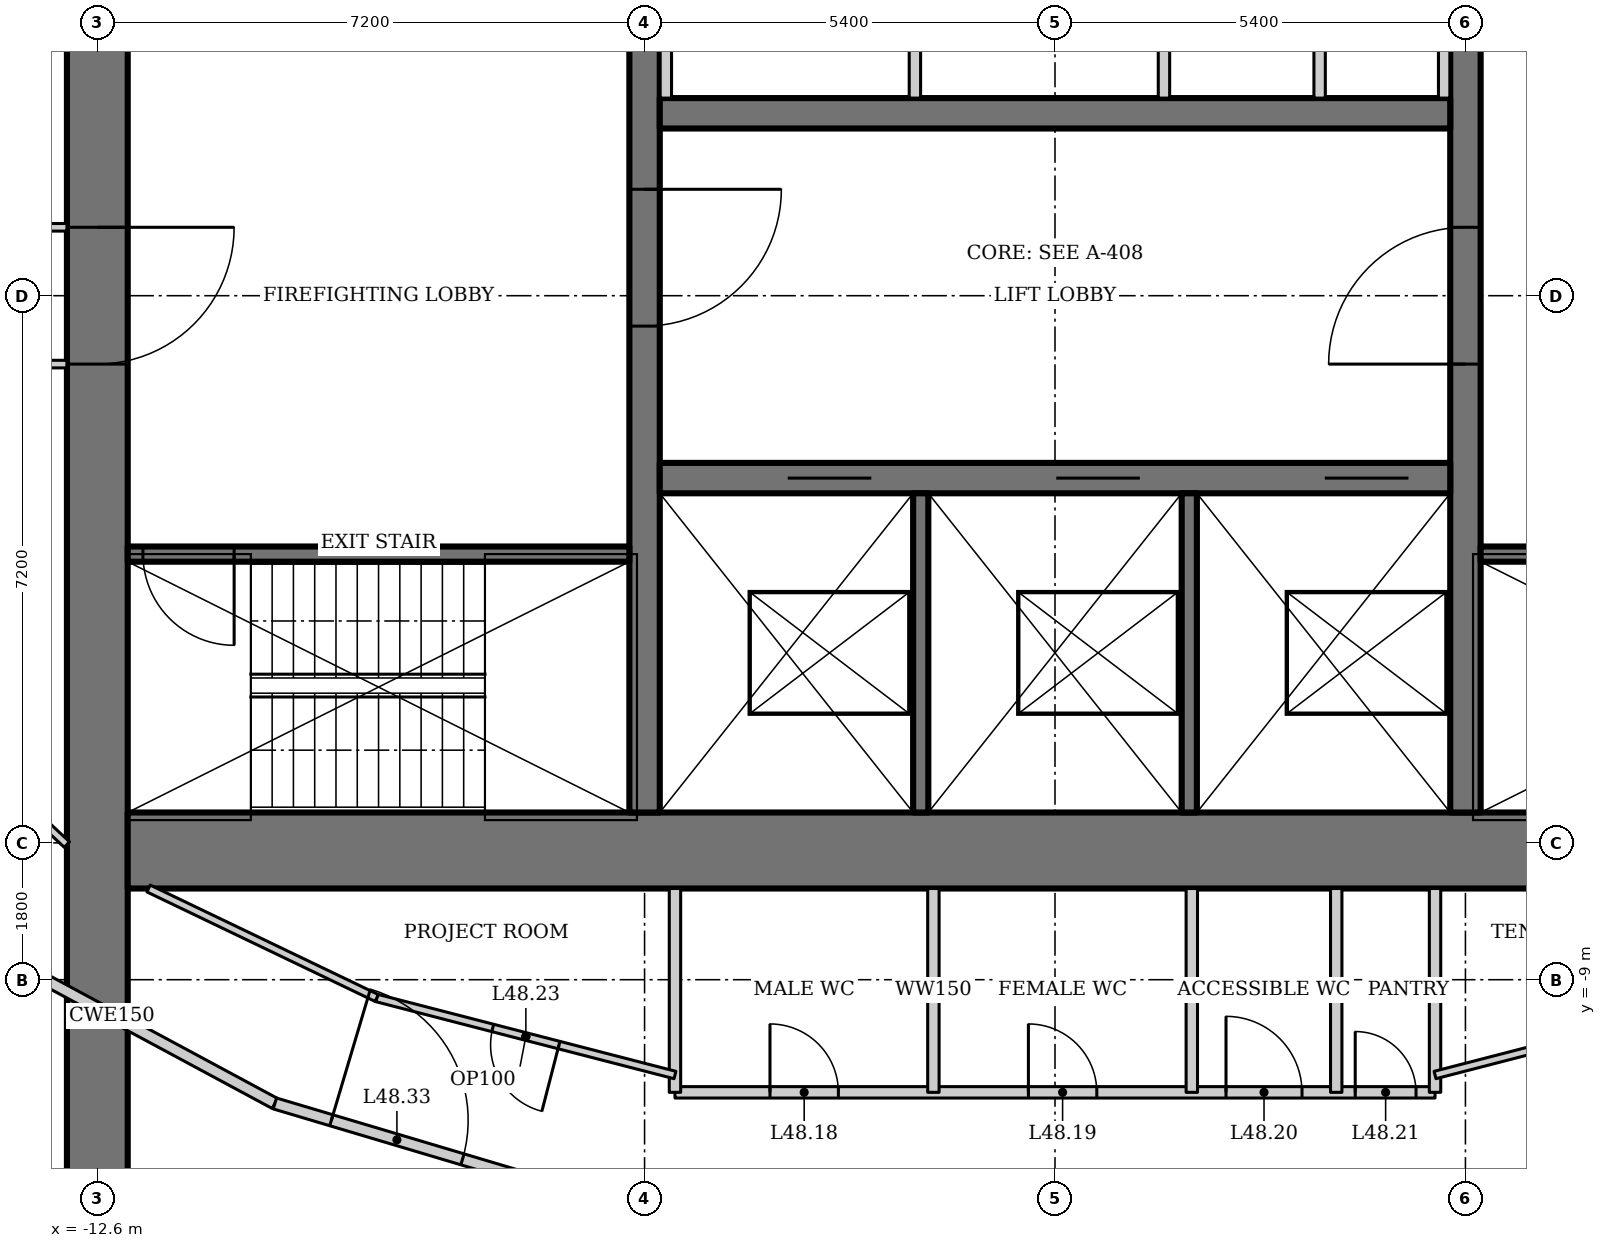
"""IFC4 building model, lengths in metres.
Left out: names, types, materials, properties, quantities, classifications, styles, units other than length and angle.
Written with IfcOpenShell. Run it as: python <this file> out.ifc"""

import sys

from ifc_helpers import new_model, si_unit, direction, frame, frame_2d, origin, place, context, subcontext, project, spatial, rectangle, extrude, element, fill, save


model = new_model("IFC4")
c1 = context("Model", 3, precision=1e-05, world=origin(), true_north=direction((0.0, 1.0)))
c2 = subcontext(c1, "Body", "Model", "MODEL_VIEW")
j1 = project(units=[si_unit("LENGTHUNIT", "METRE"), si_unit("PLANEANGLEUNIT", "RADIAN")], contexts=[c1])
p1 = place(None, origin())
s1 = spatial("IfcSite", under=j1, at=p1, CompositionType="ELEMENT")
p2 = place(p1, origin())
s2 = spatial("IfcBuilding", under=s1, at=p2, CompositionType="ELEMENT")
p3 = place(p2, frame((0.0, 0.0, 207.4)))
s3 = spatial("IfcBuildingStorey", under=s2, at=p3, CompositionType="ELEMENT", Elevation=207.4)
p4 = place(p3, frame((-12.6, 13.0, 0.0), z_axis=(0.0, 0.0, 1.0), x_axis=(0.0, -1.0, 0.0)))
e1 = element("IfcWall", 1, at=p4, inside=s3, PredefinedType="SHEAR", context=c2, shape_type="SweptSolid", body=[
    extrude(rectangle(XDim=26.0, YDim=0.8, at=frame_2d((13.0, 0.0))), origin(), (0.0, 0.0, 1.0), 4.2),
])
p5 = place(p4, frame((12.1, 0.0, 0.0)))
e2 = element("IfcOpeningElement", 2, at=p5, cuts=e1, PredefinedType="OPENING", context=c2, shape_type="SweptSolid", body=[
    extrude(rectangle(XDim=1.8, YDim=2.1, at=frame_2d((0.9, 1.05))), frame((0.0, 0.41, 0.0), z_axis=(0.0, -1.0, 0.0), x_axis=(1.0, 0.0, 0.0)), (0.0, 0.0, 1.0), 0.82),
])
p6 = place(p3, frame((-12.2, -7.3, 0.0), z_axis=(0.0, 0.0, 1.0), x_axis=(1.0, 0.0, 0.0)))
e3 = element("IfcWall", 3, at=p6, inside=s3, PredefinedType="SHEAR", context=c2, shape_type="SweptSolid", body=[
    extrude(rectangle(XDim=24.4, YDim=1.0, at=frame_2d((12.2, 0.0))), origin(), (0.0, 0.0, 1.0), 4.2),
])
p7 = place(p3, frame((5.4, -6.8, 0.0), z_axis=(0.0, 0.0, 1.0), x_axis=(0.0, 1.0, 0.0)))
e4 = element("IfcWall", 4, at=p7, inside=s3, PredefinedType="SHEAR", context=c2, shape_type="SweptSolid", body=[
    extrude(rectangle(XDim=14.6, YDim=0.4, at=frame_2d((7.3, 0.0))), origin(), (0.0, 0.0, 1.0), 4.2),
])
p8 = place(p7, frame((5.9, 0.0, 0.0)))
e5 = element("IfcOpeningElement", 5, at=p8, cuts=e4, PredefinedType="OPENING", context=c2, shape_type="SweptSolid", body=[
    extrude(rectangle(XDim=1.8, YDim=2.1, at=frame_2d((0.9, 1.05))), frame((0.0, 0.21, 0.0), z_axis=(0.0, -1.0, 0.0), x_axis=(1.0, 0.0, 0.0)), (0.0, 0.0, 1.0), 0.42),
])
p9 = place(p3, frame((-5.4, 7.8, 0.0), z_axis=(0.0, 0.0, 1.0), x_axis=(0.0, -1.0, 0.0)))
e6 = element("IfcWall", 6, at=p9, inside=s3, PredefinedType="SHEAR", context=c2, shape_type="SweptSolid", body=[
    extrude(rectangle(XDim=14.6, YDim=0.4, at=frame_2d((7.3, 0.0))), origin(), (0.0, 0.0, 1.0), 4.2),
])
p10 = place(p9, frame((6.4, 0.0, 0.0)))
e7 = element("IfcOpeningElement", 7, at=p10, cuts=e6, PredefinedType="OPENING", context=c2, shape_type="SweptSolid", body=[
    extrude(rectangle(XDim=1.8, YDim=2.1, at=frame_2d((0.9, 1.05))), frame((0.0, 0.21, 0.0), z_axis=(0.0, -1.0, 0.0), x_axis=(1.0, 0.0, 0.0)), (0.0, 0.0, 1.0), 0.42),
])
p11 = place(p3, frame((-5.2, -2.4, 0.0), z_axis=(0.0, 0.0, 1.0), x_axis=(1.0, 0.0, 0.0)))
e8 = element("IfcWall", 8, at=p11, inside=s3, PredefinedType="SHEAR", context=c2, shape_type="SweptSolid", body=[
    extrude(rectangle(XDim=10.4, YDim=0.4, at=frame_2d((5.2, 0.0))), origin(), (0.0, 0.0, 1.0), 4.2),
])
p12 = place(p11, frame((1.683, 0.0, 0.0)))
e9 = element("IfcOpeningElement", 9, at=p12, cuts=e8, PredefinedType="OPENING", context=c2, shape_type="SweptSolid", body=[
    extrude(rectangle(XDim=1.1, YDim=2.2, at=frame_2d((0.55, 1.1))), frame((0.0, 0.21, 0.0), z_axis=(0.0, -1.0, 0.0), x_axis=(1.0, 0.0, 0.0)), (0.0, 0.0, 1.0), 0.42),
])
p13 = place(p11, frame((5.217, 0.0, 0.0)))
e10 = element("IfcOpeningElement", 10, at=p13, cuts=e8, PredefinedType="OPENING", context=c2, shape_type="SweptSolid", body=[
    extrude(rectangle(XDim=1.1, YDim=2.2, at=frame_2d((0.55, 1.1))), frame((0.0, 0.21, 0.0), z_axis=(0.0, -1.0, 0.0), x_axis=(1.0, 0.0, 0.0)), (0.0, 0.0, 1.0), 0.42),
])
p14 = place(p11, frame((8.75, 0.0, 0.0)))
e11 = element("IfcOpeningElement", 11, at=p14, cuts=e8, PredefinedType="OPENING", context=c2, shape_type="SweptSolid", body=[
    extrude(rectangle(XDim=1.1, YDim=2.2, at=frame_2d((0.55, 1.1))), frame((0.0, 0.21, 0.0), z_axis=(0.0, -1.0, 0.0), x_axis=(1.0, 0.0, 0.0)), (0.0, 0.0, 1.0), 0.42),
])
for number, where, z_axis, x_axis in (
    (12, (-1.767, -2.6, 0.0), (0.0, 0.0, 1.0), (0.0, -1.0, 0.0)),
    (13, (1.767, -2.6, 0.0), (0.0, 0.0, 1.0), (0.0, -1.0, 0.0)),
):
    element("IfcWall", number, at=place(p3, frame(where, z_axis=z_axis, x_axis=x_axis)), inside=s3, PredefinedType="SOLIDWALL", context=c2, shape_type="SweptSolid", body=[
        extrude(rectangle(XDim=4.2, YDim=0.2, at=frame_2d((2.1, 0.0))), origin(), (0.0, 0.0, 1.0), 4.2),
    ])
p15 = place(p3, frame((5.2, 2.4, 0.0), z_axis=(0.0, 0.0, 1.0), x_axis=(-1.0, 0.0, 0.0)))
e14 = element("IfcWall", 14, at=p15, inside=s3, PredefinedType="SHEAR", context=c2, shape_type="SweptSolid", body=[
    extrude(rectangle(XDim=10.4, YDim=0.4, at=frame_2d((5.2, 0.0))), origin(), (0.0, 0.0, 1.0), 4.2),
])
p16 = place(p3, frame((5.6, -3.4, 0.0), z_axis=(0.0, 0.0, 1.0), x_axis=(1.0, 0.0, 0.0)))
e15 = element("IfcWall", 15, at=p16, inside=s3, PredefinedType="SHEAR", context=c2, shape_type="SweptSolid", body=[
    extrude(rectangle(XDim=6.6, YDim=0.2, at=frame_2d((3.3, 0.0))), origin(), (0.0, 0.0, 1.0), 4.2),
])
p17 = place(p16, frame((5.2, 0.0, 0.0)))
e16 = element("IfcOpeningElement", 16, at=p17, cuts=e15, PredefinedType="OPENING", context=c2, shape_type="SweptSolid", body=[
    extrude(rectangle(XDim=1.2, YDim=2.1, at=frame_2d((0.6, 1.05))), frame((0.0, 0.11, 0.0), z_axis=(0.0, -1.0, 0.0), x_axis=(1.0, 0.0, 0.0)), (0.0, 0.0, 1.0), 0.22),
])
p18 = place(p3, frame((-5.6, -3.4, 0.0), z_axis=(0.0, 0.0, 1.0), x_axis=(-1.0, 0.0, 0.0)))
e17 = element("IfcWall", 17, at=p18, inside=s3, PredefinedType="SHEAR", context=c2, shape_type="SweptSolid", body=[
    extrude(rectangle(XDim=6.6, YDim=0.2, at=frame_2d((3.3, 0.0))), origin(), (0.0, 0.0, 1.0), 4.2),
])
p19 = place(p18, frame((5.2, 0.0, 0.0)))
e18 = element("IfcOpeningElement", 18, at=p19, cuts=e17, PredefinedType="OPENING", context=c2, shape_type="SweptSolid", body=[
    extrude(rectangle(XDim=1.2, YDim=2.1, at=frame_2d((0.6, 1.05))), frame((0.0, 0.11, 0.0), z_axis=(0.0, -1.0, 0.0), x_axis=(1.0, 0.0, 0.0)), (0.0, 0.0, 1.0), 0.22),
])
p20 = place(p3, frame((-14.556, -8.318, 0.0), z_axis=(0.0, 0.0, 1.0), x_axis=(0.88053863253, -0.47397438393, 0.0)))
e19 = element("IfcWall", 19, at=p20, inside=s3, PredefinedType="PARTITIONING", context=c2, shape_type="SweptSolid", body=[
    extrude(rectangle(XDim=4.875, YDim=0.15, at=frame_2d((2.438, 0.0))), origin(), (0.0, 0.0, 1.0), 4.05),
])
p21 = place(p3, frame((-10.264, -10.628, 0.0), z_axis=(0.0, 0.0, 1.0), x_axis=(0.958384389306, -0.285480931648, 0.0)))
e20 = element("IfcWall", 20, at=p21, inside=s3, PredefinedType="PARTITIONING", context=c2, shape_type="SweptSolid", body=[
    extrude(rectangle(XDim=4.392, YDim=0.15, at=frame_2d((2.196, 0.0))), origin(), (0.0, 0.0, 1.0), 4.05),
])
p22 = place(p21, frame((0.775, 0.0, 0.0)))
e21 = element("IfcOpeningElement", 21, at=p22, cuts=e20, PredefinedType="OPENING", context=c2, shape_type="SweptSolid", body=[
    extrude(rectangle(XDim=1.8, YDim=2.1, at=frame_2d((0.9, 1.05))), frame((0.0, 0.085, 0.0), z_axis=(0.0, -1.0, 0.0), x_axis=(1.0, 0.0, 0.0)), (0.0, 0.0, 1.0), 0.17),
])
p23 = place(p3, frame((6.054, -11.882, 0.0), z_axis=(0.0, 0.0, 1.0), x_axis=(0.958384389306, 0.285480931648, 0.0)))
e22 = element("IfcWall", 22, at=p23, inside=s3, PredefinedType="PARTITIONING", context=c2, shape_type="SweptSolid", body=[
    extrude(rectangle(XDim=4.392, YDim=0.15, at=frame_2d((2.196, 0.0))), origin(), (0.0, 0.0, 1.0), 4.05),
])
for number, where, z_axis, x_axis in (
    (23, (-5.12, 2.6, 0.0), (0.0, 0.0, 1.0), (0.0, 1.0, 0.0)),
    (24, (5.12, 2.6, 0.0), (0.0, 0.0, 1.0), (0.0, 1.0, 0.0)),
    (25, (-1.843, 2.6, 0.0), (0.0, 0.0, 1.0), (0.0, 1.0, 0.0)),
):
    element("IfcWall", number, at=place(p3, frame(where, z_axis=z_axis, x_axis=x_axis)), inside=s3, PredefinedType="SOLIDWALL", context=c2, shape_type="SweptSolid", body=[
        extrude(rectangle(XDim=4.4, YDim=0.15, at=frame_2d((2.2, 0.0))), origin(), (0.0, 0.0, 1.0), 4.05),
    ])
p24 = place(p3, frame((1.434, 2.6, 0.0), z_axis=(0.0, 0.0, 1.0), x_axis=(0.0, 1.0, 0.0)))
e26 = element("IfcWall", 26, at=p24, inside=s3, PredefinedType="SOLIDWALL", context=c2, shape_type="SweptSolid", body=[
    extrude(rectangle(XDim=4.4, YDim=0.15, at=frame_2d((2.2, 0.0))), origin(), (0.0, 0.0, 1.0), 3.108),
])
p25 = place(p3, frame((3.482, 2.6, 0.0), z_axis=(0.0, 0.0, 1.0), x_axis=(0.0, 1.0, 0.0)))
e27 = element("IfcWall", 27, at=p25, inside=s3, PredefinedType="SOLIDWALL", context=c2, shape_type="SweptSolid", body=[
    extrude(rectangle(XDim=4.4, YDim=0.15, at=frame_2d((2.2, 0.0))), origin(), (0.0, 0.0, 1.0), 4.05),
])
p26 = place(p3, frame((-5.0, -10.482, 0.0), z_axis=(0.0, 0.0, 1.0), x_axis=(1.0, 0.0, 0.0)))
e28 = element("IfcWall", 28, at=p26, inside=s3, PredefinedType="SOLIDWALL", context=c2, shape_type="SweptSolid", body=[
    extrude(rectangle(XDim=10.0, YDim=0.15, at=frame_2d((5.0, 0.0))), origin(), (0.0, 0.0, 1.0), 4.05),
])
p27 = place(p26, frame((1.25, 0.0, 0.0)))
e29 = element("IfcOpeningElement", 29, at=p27, cuts=e28, PredefinedType="OPENING", context=c2, shape_type="SweptSolid", body=[
    extrude(rectangle(XDim=0.9, YDim=2.1, at=frame_2d((0.45, 1.05))), frame((0.0, 0.085, 0.0), z_axis=(0.0, -1.0, 0.0), x_axis=(1.0, 0.0, 0.0)), (0.0, 0.0, 1.0), 0.17),
])
p28 = place(p26, frame((4.65, 0.0, 0.0)))
e30 = element("IfcOpeningElement", 30, at=p28, cuts=e28, PredefinedType="OPENING", context=c2, shape_type="SweptSolid", body=[
    extrude(rectangle(XDim=0.9, YDim=2.1, at=frame_2d((0.45, 1.05))), frame((0.0, 0.085, 0.0), z_axis=(0.0, -1.0, 0.0), x_axis=(1.0, 0.0, 0.0)), (0.0, 0.0, 1.0), 0.17),
])
p29 = place(p26, frame((7.25, 0.0, 0.0)))
e31 = element("IfcOpeningElement", 31, at=p29, cuts=e28, PredefinedType="OPENING", context=c2, shape_type="SweptSolid", body=[
    extrude(rectangle(XDim=1.0, YDim=2.1, at=frame_2d((0.5, 1.05))), frame((0.0, 0.085, 0.0), z_axis=(0.0, -1.0, 0.0), x_axis=(1.0, 0.0, 0.0)), (0.0, 0.0, 1.0), 0.17),
])
p30 = place(p26, frame((8.95, 0.0, 0.0)))
e32 = element("IfcOpeningElement", 32, at=p30, cuts=e28, PredefinedType="OPENING", context=c2, shape_type="SweptSolid", body=[
    extrude(rectangle(XDim=0.8, YDim=2.1, at=frame_2d((0.4, 1.05))), frame((0.0, 0.085, 0.0), z_axis=(0.0, -1.0, 0.0), x_axis=(1.0, 0.0, 0.0)), (0.0, 0.0, 1.0), 0.17),
])
for number, where, z_axis, x_axis in (
    (33, (-5.0, -7.8, 0.0), (0.0, 0.0, 1.0), (0.0, -1.0, 0.0)),
    (34, (5.0, -7.8, 0.0), (0.0, 0.0, 1.0), (0.0, -1.0, 0.0)),
    (35, (-1.6, -7.8, 0.0), (0.0, 0.0, 1.0), (0.0, -1.0, 0.0)),
):
    element("IfcWall", number, at=place(p3, frame(where, z_axis=z_axis, x_axis=x_axis)), inside=s3, PredefinedType="SOLIDWALL", context=c2, shape_type="SweptSolid", body=[
        extrude(rectangle(XDim=2.682, YDim=0.15, at=frame_2d((1.341, 0.0))), origin(), (0.0, 0.0, 1.0), 4.05),
    ])
p31 = place(p3, frame((1.8, -7.8, 0.0), z_axis=(0.0, 0.0, 1.0), x_axis=(0.0, -1.0, 0.0)))
e36 = element("IfcWall", 36, at=p31, inside=s3, PredefinedType="SOLIDWALL", context=c2, shape_type="SweptSolid", body=[
    extrude(rectangle(XDim=2.682, YDim=0.15, at=frame_2d((1.341, 0.0))), origin(), (0.0, 0.0, 1.0), 3.293),
])
p32 = place(p3, frame((3.7, -7.8, 0.0), z_axis=(0.0, 0.0, 1.0), x_axis=(0.0, -1.0, 0.0)))
e37 = element("IfcWall", 37, at=p32, inside=s3, PredefinedType="SOLIDWALL", context=c2, shape_type="SweptSolid", body=[
    extrude(rectangle(XDim=2.682, YDim=0.15, at=frame_2d((1.341, 0.0))), origin(), (0.0, 0.0, 1.0), 4.05),
])
p33 = place(p3, frame((-13.0, -7.222, 0.0), z_axis=(0.0, 0.0, 1.0), x_axis=(-0.730651186567, 0.682750938167, 0.0)))
e38 = element("IfcWall", 38, at=p33, inside=s3, PredefinedType="PARTITIONING", context=c2, shape_type="SweptSolid", body=[
    extrude(rectangle(XDim=4.603, YDim=0.1, at=frame_2d((2.301, 0.0))), origin(), (0.0, 0.0, 1.0), 4.05),
])
p34 = place(p33, frame((1.851, 0.0, 0.0)))
e39 = element("IfcOpeningElement", 39, at=p34, cuts=e38, PredefinedType="OPENING", context=c2, shape_type="SweptSolid", body=[
    extrude(rectangle(XDim=0.9, YDim=2.1, at=frame_2d((0.45, 1.05))), frame((0.0, 0.06, 0.0), z_axis=(0.0, -1.0, 0.0), x_axis=(1.0, 0.0, 0.0)), (0.0, 0.0, 1.0), 0.12),
])
p35 = place(p3, frame((-5.0, -10.254, 0.0), z_axis=(0.0, 0.0, 1.0), x_axis=(-0.968224167198, 0.250083910027, 0.0)))
e40 = element("IfcWall", 40, at=p35, inside=s3, PredefinedType="PARTITIONING", context=c2, shape_type="SweptSolid", body=[
    extrude(rectangle(XDim=4.052, YDim=0.1, at=frame_2d((2.026, 0.0))), origin(), (0.0, 0.0, 1.0), 4.05),
])
p36 = place(p35, frame((1.576, 0.0, 0.0)))
e41 = element("IfcOpeningElement", 41, at=p36, cuts=e40, PredefinedType="OPENING", context=c2, shape_type="SweptSolid", body=[
    extrude(rectangle(XDim=0.9, YDim=2.1, at=frame_2d((0.45, 1.05))), frame((0.0, 0.06, 0.0), z_axis=(0.0, -1.0, 0.0), x_axis=(1.0, 0.0, 0.0)), (0.0, 0.0, 1.0), 0.12),
])
p37 = place(p3, frame((-8.924, -9.241, 0.0), z_axis=(0.0, 0.0, 1.0), x_axis=(-0.901553947207, 0.432666708073, 0.0)))
e42 = element("IfcWall", 42, at=p37, inside=s3, PredefinedType="PARTITIONING", context=c2, shape_type="SweptSolid", body=[
    extrude(rectangle(XDim=3.33, YDim=0.1, at=frame_2d((1.665, 0.0))), origin(), (0.0, 0.0, 1.0), 4.05),
])
p38 = place(p3, frame((8.924, -9.241, 0.0), z_axis=(0.0, 0.0, 1.0), x_axis=(-0.968224167198, -0.250083910027, 0.0)))
e43 = element("IfcWall", 43, at=p38, inside=s3, PredefinedType="PARTITIONING", context=c2, shape_type="SweptSolid", body=[
    extrude(rectangle(XDim=4.052, YDim=0.1, at=frame_2d((2.026, 0.0))), origin(), (0.0, 0.0, 1.0), 4.05),
])
p39 = place(p38, frame((1.576, 0.0, 0.0)))
e44 = element("IfcOpeningElement", 44, at=p39, cuts=e43, PredefinedType="OPENING", context=c2, shape_type="SweptSolid", body=[
    extrude(rectangle(XDim=0.9, YDim=2.1, at=frame_2d((0.45, 1.05))), frame((0.0, 0.06, 0.0), z_axis=(0.0, -1.0, 0.0), x_axis=(1.0, 0.0, 0.0)), (0.0, 0.0, 1.0), 0.12),
])
for number, where, z_axis, x_axis in (
    (45, (-15.165, -0.9, 0.0), (0.0, 0.0, 1.0), (1.0, 0.0, 0.0)),
    (46, (-13.0, 0.9, 0.0), (0.0, 0.0, 1.0), (-1.0, 0.0, 0.0)),
):
    element("IfcWall", number, at=place(p3, frame(where, z_axis=z_axis, x_axis=x_axis)), inside=s3, PredefinedType="PARTITIONING", context=c2, shape_type="SweptSolid", body=[
        extrude(rectangle(XDim=2.165, YDim=0.1, at=frame_2d((1.083, 0.0))), origin(), (0.0, 0.0, 1.0), 4.05),
    ])
p40 = place(p8, origin())
e47 = element("IfcDoor", 47, at=p40, inside=s3, OperationType="DOUBLE_DOOR_DOUBLE_SWING", PredefinedType="DOOR", context=c2, shape_type="SweptSolid", body=[
    extrude(rectangle(XDim=1.8, YDim=2.1, at=frame_2d((0.9, 1.05))), frame((0.0, 0.025, 0.0), z_axis=(0.0, -1.0, 0.0), x_axis=(1.0, 0.0, 0.0)), (0.0, 0.0, 1.0), 0.05),
])
fill(e5, e47)
p41 = place(p10, origin())
e48 = element("IfcDoor", 48, at=p41, inside=s3, OperationType="DOUBLE_DOOR_DOUBLE_SWING", PredefinedType="DOOR", context=c2, shape_type="SweptSolid", body=[
    extrude(rectangle(XDim=1.8, YDim=2.1, at=frame_2d((0.9, 1.05))), frame((0.0, 0.025, 0.0), z_axis=(0.0, -1.0, 0.0), x_axis=(1.0, 0.0, 0.0)), (0.0, 0.0, 1.0), 0.05),
])
fill(e7, e48)
p42 = place(p19, origin())
e49 = element("IfcDoor", 49, at=p42, inside=s3, OperationType="SINGLE_SWING_RIGHT", PredefinedType="DOOR", context=c2, shape_type="SweptSolid", body=[
    extrude(rectangle(XDim=1.2, YDim=2.1, at=frame_2d((0.6, 1.05))), frame((0.0, 0.025, 0.0), z_axis=(0.0, -1.0, 0.0), x_axis=(1.0, 0.0, 0.0)), (0.0, 0.0, 1.0), 0.05),
])
fill(e18, e49)
p43 = place(p5, origin())
e50 = element("IfcDoor", 50, at=p43, inside=s3, OperationType="DOUBLE_DOOR_DOUBLE_SWING", PredefinedType="DOOR", context=c2, shape_type="SweptSolid", body=[
    extrude(rectangle(XDim=1.8, YDim=2.1, at=frame_2d((0.9, 1.05))), frame((0.0, 0.025, 0.0), z_axis=(0.0, -1.0, 0.0), x_axis=(1.0, 0.0, 0.0)), (0.0, 0.0, 1.0), 0.05),
])
fill(e2, e50)
p44 = place(p12, origin())
e51 = element("IfcDoor", 51, at=p44, inside=s3, OperationType="DOUBLE_DOOR_SLIDING", PredefinedType="DOOR", context=c2, shape_type="SweptSolid", body=[
    extrude(rectangle(XDim=1.1, YDim=2.2, at=frame_2d((0.55, 1.1))), frame((0.0, 0.025, 0.0), z_axis=(0.0, -1.0, 0.0), x_axis=(1.0, 0.0, 0.0)), (0.0, 0.0, 1.0), 0.05),
])
fill(e9, e51)
p45 = place(p13, origin())
e52 = element("IfcDoor", 52, at=p45, inside=s3, OperationType="DOUBLE_DOOR_SLIDING", PredefinedType="DOOR", context=c2, shape_type="SweptSolid", body=[
    extrude(rectangle(XDim=1.1, YDim=2.2, at=frame_2d((0.55, 1.1))), frame((0.0, 0.025, 0.0), z_axis=(0.0, -1.0, 0.0), x_axis=(1.0, 0.0, 0.0)), (0.0, 0.0, 1.0), 0.05),
])
fill(e10, e52)
p46 = place(p14, origin())
e53 = element("IfcDoor", 53, at=p46, inside=s3, OperationType="DOUBLE_DOOR_SLIDING", PredefinedType="DOOR", context=c2, shape_type="SweptSolid", body=[
    extrude(rectangle(XDim=1.1, YDim=2.2, at=frame_2d((0.55, 1.1))), frame((0.0, 0.025, 0.0), z_axis=(0.0, -1.0, 0.0), x_axis=(1.0, 0.0, 0.0)), (0.0, 0.0, 1.0), 0.05),
])
fill(e11, e53)
p47 = place(p27, origin())
e54 = element("IfcDoor", 54, at=p47, inside=s3, OperationType="SINGLE_SWING_LEFT", PredefinedType="DOOR", context=c2, shape_type="SweptSolid", body=[
    extrude(rectangle(XDim=0.9, YDim=2.1, at=frame_2d((0.45, 1.05))), frame((0.0, 0.025, 0.0), z_axis=(0.0, -1.0, 0.0), x_axis=(1.0, 0.0, 0.0)), (0.0, 0.0, 1.0), 0.05),
])
fill(e29, e54)
p48 = place(p28, origin())
e55 = element("IfcDoor", 55, at=p48, inside=s3, OperationType="SINGLE_SWING_LEFT", PredefinedType="DOOR", context=c2, shape_type="SweptSolid", body=[
    extrude(rectangle(XDim=0.9, YDim=2.1, at=frame_2d((0.45, 1.05))), frame((0.0, 0.025, 0.0), z_axis=(0.0, -1.0, 0.0), x_axis=(1.0, 0.0, 0.0)), (0.0, 0.0, 1.0), 0.05),
])
fill(e30, e55)
p49 = place(p29, origin())
e56 = element("IfcDoor", 56, at=p49, inside=s3, OperationType="SINGLE_SWING_LEFT", PredefinedType="DOOR", context=c2, shape_type="SweptSolid", body=[
    extrude(rectangle(XDim=1.0, YDim=2.1, at=frame_2d((0.5, 1.05))), frame((0.0, 0.025, 0.0), z_axis=(0.0, -1.0, 0.0), x_axis=(1.0, 0.0, 0.0)), (0.0, 0.0, 1.0), 0.05),
])
fill(e31, e56)
p50 = place(p30, origin())
e57 = element("IfcDoor", 57, at=p50, inside=s3, OperationType="SINGLE_SWING_LEFT", PredefinedType="DOOR", context=c2, shape_type="SweptSolid", body=[
    extrude(rectangle(XDim=0.8, YDim=2.1, at=frame_2d((0.4, 1.05))), frame((0.0, 0.025, 0.0), z_axis=(0.0, -1.0, 0.0), x_axis=(1.0, 0.0, 0.0)), (0.0, 0.0, 1.0), 0.05),
])
fill(e32, e57)
p51 = place(p36, origin())
e58 = element("IfcDoor", 58, at=p51, inside=s3, OperationType="SINGLE_SWING_LEFT", PredefinedType="DOOR", context=c2, shape_type="SweptSolid", body=[
    extrude(rectangle(XDim=0.9, YDim=2.1, at=frame_2d((0.45, 1.05))), frame((0.0, 0.025, 0.0), z_axis=(0.0, -1.0, 0.0), x_axis=(1.0, 0.0, 0.0)), (0.0, 0.0, 1.0), 0.05),
])
fill(e41, e58)
p52 = place(p22, origin())
e59 = element("IfcDoor", 59, at=p52, inside=s3, OperationType="DOUBLE_DOOR_DOUBLE_SWING", PredefinedType="DOOR", context=c2, shape_type="SweptSolid", body=[
    extrude(rectangle(XDim=1.8, YDim=2.1, at=frame_2d((0.9, 1.05))), frame((0.0, 0.025, 0.0), z_axis=(0.0, -1.0, 0.0), x_axis=(1.0, 0.0, 0.0)), (0.0, 0.0, 1.0), 0.05),
])
fill(e21, e59)
save(model, sys.argv[1])
